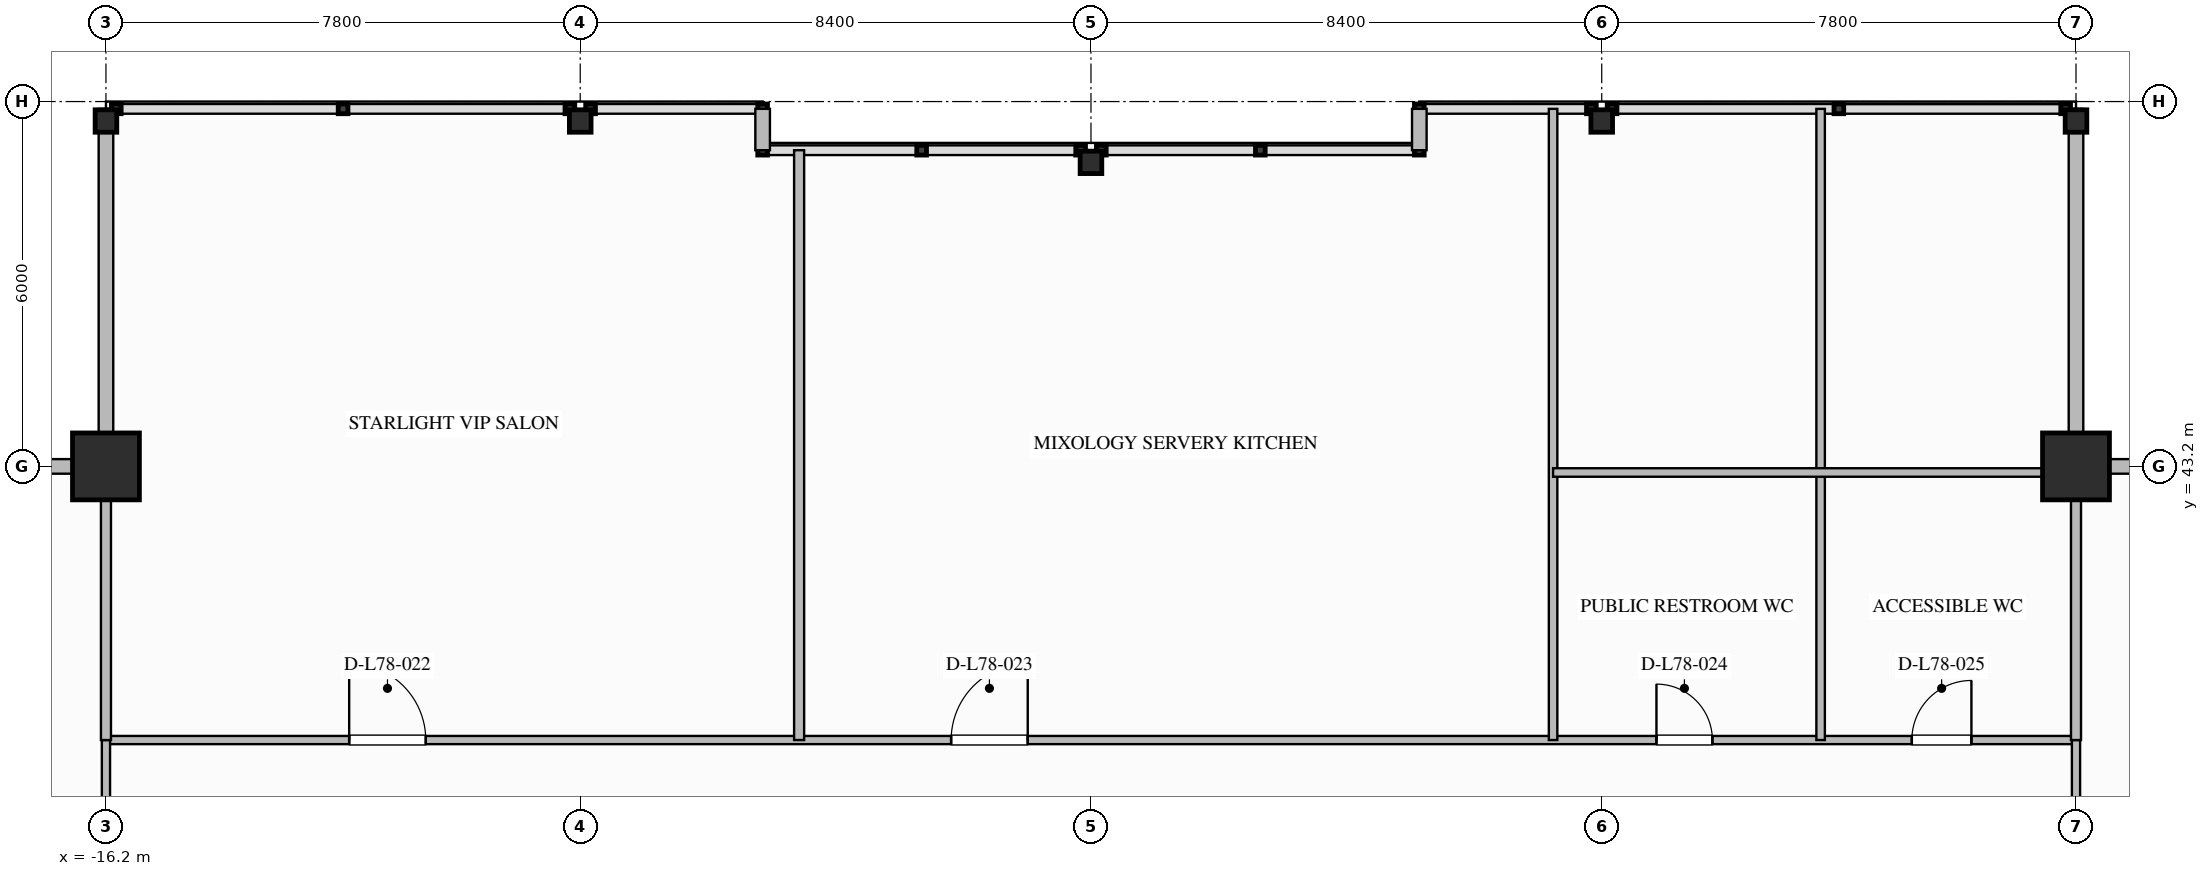
"""IFC4 building model, lengths in metres.
Left out: names, types, materials, properties, quantities, classifications, styles, units other than length and angle.
Written with IfcOpenShell. Run it as: python <this file> out.ifc"""

import sys

from ifc_helpers import new_model, si_unit, direction, frame, frame_2d, origin, origin_2d, place, context, subcontext, project, spatial, rectangle, i_section, extrude, element, fill, save


model = new_model("IFC4")
c1 = context("Model", 3, precision=1e-05, world=origin(), true_north=direction((0.0, 1.0)))
c2 = subcontext(c1, "Body", "Model", "MODEL_VIEW")
j1 = project(units=[si_unit("LENGTHUNIT", "METRE"), si_unit("PLANEANGLEUNIT", "RADIAN")], contexts=[c1])
p1 = place(None, origin())
s1 = spatial("IfcSite", under=j1, at=p1, CompositionType="ELEMENT")
p2 = place(p1, origin())
s2 = spatial("IfcBuilding", under=s1, at=p2, CompositionType="ELEMENT")
p3 = place(p2, frame((0.0, 0.0, 298.6)))
s3 = spatial("IfcBuildingStorey", under=s2, at=p3, CompositionType="ELEMENT", Elevation=298.6)
for number, where, z_axis, x_axis in (
    (1, (-16.2, 43.2, 0.0), (0.0, 0.0, 1.0), (1.0, 0.0, 0.0)),
    (2, (16.2, 43.2, 0.0), (0.0, 0.0, 1.0), (1.0, 0.0, 0.0)),
):
    element("IfcColumn", number, at=place(p3, frame(where, z_axis=z_axis, x_axis=x_axis)), inside=s3, PredefinedType="COLUMN", context=c2, shape_type="SweptSolid", body=[
        extrude(rectangle(XDim=1.1, YDim=1.1, at=origin_2d()), origin(), (0.0, 0.0, 1.0), 4.4),
    ])
for number, where, z_axis, x_axis in (
    (3, (-16.2, 48.88, 0.0), (0.0, 0.0, 1.0), (0.0, 1.0, 0.0)),
    (4, (-8.4, 48.88, 0.0), (0.0, 0.0, 1.0), (0.0, 1.0, 0.0)),
    (5, (0.0, 48.2, 0.0), (0.0, 0.0, 1.0), (0.0, 1.0, 0.0)),
    (6, (8.4, 48.88, 0.0), (0.0, 0.0, 1.0), (0.0, 1.0, 0.0)),
    (7, (16.2, 48.88, 0.0), (0.0, 0.0, 1.0), (0.0, 1.0, 0.0)),
):
    element("IfcColumn", number, at=place(p3, frame(where, z_axis=z_axis, x_axis=x_axis)), inside=s3, PredefinedType="COLUMN", context=c2, shape_type="SweptSolid", body=[
        extrude(i_section(OverallWidth=0.369, OverallDepth=0.356, WebThickness=0.011, FlangeThickness=0.018, FilletRadius=0.025, at=origin_2d()), origin(), (0.0, 0.0, 1.0), 4.397),
    ])
for number, where, z_axis, x_axis in (
    (8, (-22.08, 43.2, 0.0), (0.0, 0.0, 1.0), (1.0, 0.0, 0.0)),
    (9, (-16.2, 43.2, 0.0), (0.0, 0.0, 1.0), (0.0, 1.0, 0.0)),
    (10, (16.2, 49.08, 0.0), (0.0, 0.0, 1.0), (0.0, -1.0, 0.0)),
    (11, (16.2, 43.2, 0.0), (0.0, 0.0, 1.0), (1.0, 0.0, 0.0)),
):
    element("IfcWall", number, at=place(p3, frame(where, z_axis=z_axis, x_axis=x_axis)), inside=s3, PredefinedType="STANDARD", context=c2, shape_type="SweptSolid", body=[
        extrude(rectangle(XDim=5.88, YDim=0.24, at=frame_2d((2.94, 0.0))), origin(), (0.0, 0.0, 1.0), 3.439),
    ])
for number, where, z_axis, x_axis in (
    (12, (-5.4, 49.08, 0.0), (0.0, 0.0, 1.0), (0.0, -1.0, 0.0)),
    (13, (5.4, 48.4, 0.0), (0.0, 0.0, 1.0), (0.0, 1.0, 0.0)),
):
    element("IfcWall", number, at=place(p3, frame(where, z_axis=z_axis, x_axis=x_axis)), inside=s3, PredefinedType="STANDARD", context=c2, shape_type="SweptSolid", body=[
        extrude(rectangle(XDim=0.68, YDim=0.24, at=frame_2d((0.34, 0.0))), origin(), (0.0, 0.0, 1.0), 4.05),
    ])
p4 = place(p3, frame((-16.2, 38.7, 0.0), z_axis=(0.0, 0.0, 1.0), x_axis=(1.0, 0.0, 0.0)))
e14 = element("IfcWall", 14, at=p4, inside=s3, PredefinedType="PARTITIONING", context=c2, shape_type="SweptSolid", body=[
    extrude(rectangle(XDim=32.4, YDim=0.135, at=frame_2d((16.2, 0.0))), origin(), (0.0, 0.0, 1.0), 4.05),
])
p5 = place(p4, frame((4.0, 0.0, 0.0)))
e15 = element("IfcOpeningElement", 15, at=p5, cuts=e14, PredefinedType="OPENING", context=c2, shape_type="SweptSolid", body=[
    extrude(rectangle(XDim=1.26, YDim=2.2, at=frame_2d((0.63, 1.1))), frame((0.0, 0.077, 0.0), z_axis=(0.0, -1.0, 0.0), x_axis=(1.0, 0.0, 0.0)), (0.0, 0.0, 1.0), 0.155),
])
p6 = place(p4, frame((13.9, 0.0, 0.0)))
e16 = element("IfcOpeningElement", 16, at=p6, cuts=e14, PredefinedType="OPENING", context=c2, shape_type="SweptSolid", body=[
    extrude(rectangle(XDim=1.26, YDim=2.2, at=frame_2d((0.63, 1.1))), frame((0.0, 0.077, 0.0), z_axis=(0.0, -1.0, 0.0), x_axis=(1.0, 0.0, 0.0)), (0.0, 0.0, 1.0), 0.155),
])
p7 = place(p4, frame((25.5, 0.0, 0.0)))
e17 = element("IfcOpeningElement", 17, at=p7, cuts=e14, PredefinedType="OPENING", context=c2, shape_type="SweptSolid", body=[
    extrude(rectangle(XDim=0.92, YDim=2.1, at=frame_2d((0.46, 1.05))), frame((0.0, 0.077, 0.0), z_axis=(0.0, -1.0, 0.0), x_axis=(1.0, 0.0, 0.0)), (0.0, 0.0, 1.0), 0.155),
])
p8 = place(p4, frame((29.7, 0.0, 0.0)))
e18 = element("IfcOpeningElement", 18, at=p8, cuts=e14, PredefinedType="OPENING", context=c2, shape_type="SweptSolid", body=[
    extrude(rectangle(XDim=0.98, YDim=2.1, at=frame_2d((0.49, 1.05))), frame((0.0, 0.077, 0.0), z_axis=(0.0, -1.0, 0.0), x_axis=(1.0, 0.0, 0.0)), (0.0, 0.0, 1.0), 0.155),
])
for number, where, z_axis, x_axis in (
    (19, (-16.2, 35.6, 0.0), (0.0, 0.0, 1.0), (0.0, 1.0, 0.0)),
    (20, (16.2, 35.6, 0.0), (0.0, 0.0, 1.0), (0.0, 1.0, 0.0)),
):
    element("IfcWall", number, at=place(p3, frame(where, z_axis=z_axis, x_axis=x_axis)), inside=s3, PredefinedType="PARTITIONING", context=c2, shape_type="SweptSolid", body=[
        extrude(rectangle(XDim=3.1, YDim=0.135, at=frame_2d((1.55, 0.0))), origin(), (0.0, 0.0, 1.0), 3.424),
    ])
for number, where, z_axis, x_axis in (
    (21, (-16.2, 38.7, 0.0), (0.0, 0.0, 1.0), (0.0, 1.0, 0.0)),
    (22, (16.2, 38.7, 0.0), (0.0, 0.0, 1.0), (0.0, 1.0, 0.0)),
):
    element("IfcWall", number, at=place(p3, frame(where, z_axis=z_axis, x_axis=x_axis)), inside=s3, PredefinedType="PARTITIONING", context=c2, shape_type="SweptSolid", body=[
        extrude(rectangle(XDim=4.38, YDim=0.165, at=frame_2d((2.19, 0.0))), origin(), (0.0, 0.0, 1.0), 3.424),
    ])
p9 = place(p3, frame((-4.8, 38.7, 0.0), z_axis=(0.0, 0.0, 1.0), x_axis=(0.0, 1.0, 0.0)))
e23 = element("IfcWall", 23, at=p9, inside=s3, PredefinedType="PARTITIONING", context=c2, shape_type="SweptSolid", body=[
    extrude(rectangle(XDim=9.7, YDim=0.165, at=frame_2d((4.85, 0.0))), origin(), (0.0, 0.0, 1.0), 4.05),
])
for number, where, z_axis, x_axis in (
    (24, (7.6, 38.7, 0.0), (0.0, 0.0, 1.0), (0.0, 1.0, 0.0)),
    (25, (12.0, 38.7, 0.0), (0.0, 0.0, 1.0), (0.0, 1.0, 0.0)),
):
    element("IfcWall", number, at=place(p3, frame(where, z_axis=z_axis, x_axis=x_axis)), inside=s3, PredefinedType="PLUMBINGWALL", context=c2, shape_type="SweptSolid", body=[
        extrude(rectangle(XDim=10.38, YDim=0.14, at=frame_2d((5.19, 0.0))), origin(), (0.0, 0.0, 1.0), 4.05),
    ])
p10 = place(p3, frame((7.6, 43.1, 0.0), z_axis=(0.0, 0.0, 1.0), x_axis=(1.0, 0.0, 0.0)))
e26 = element("IfcWall", 26, at=p10, inside=s3, PredefinedType="PLUMBINGWALL", context=c2, shape_type="SweptSolid", body=[
    extrude(rectangle(XDim=8.6, YDim=0.14, at=frame_2d((4.3, 0.0))), origin(), (0.0, 0.0, 1.0), 3.424),
])
p11 = place(p5, origin())
e27 = element("IfcDoor", 27, at=p11, inside=s3, OperationType="SINGLE_SWING_LEFT", PredefinedType="DOOR", context=c2, shape_type="SweptSolid", body=[
    extrude(rectangle(XDim=1.26, YDim=2.2, at=frame_2d((0.63, 1.1))), frame((0.0, 0.025, 0.0), z_axis=(0.0, -1.0, 0.0), x_axis=(1.0, 0.0, 0.0)), (0.0, 0.0, 1.0), 0.05),
])
fill(e15, e27)
p12 = place(p6, origin())
e28 = element("IfcDoor", 28, at=p12, inside=s3, OperationType="SINGLE_SWING_RIGHT", PredefinedType="DOOR", context=c2, shape_type="SweptSolid", body=[
    extrude(rectangle(XDim=1.26, YDim=2.2, at=frame_2d((0.63, 1.1))), frame((0.0, 0.025, 0.0), z_axis=(0.0, -1.0, 0.0), x_axis=(1.0, 0.0, 0.0)), (0.0, 0.0, 1.0), 0.05),
])
fill(e16, e28)
p13 = place(p7, origin())
e29 = element("IfcDoor", 29, at=p13, inside=s3, OperationType="SINGLE_SWING_LEFT", PredefinedType="DOOR", context=c2, shape_type="SweptSolid", body=[
    extrude(rectangle(XDim=0.92, YDim=2.1, at=frame_2d((0.46, 1.05))), frame((0.0, 0.025, 0.0), z_axis=(0.0, -1.0, 0.0), x_axis=(1.0, 0.0, 0.0)), (0.0, 0.0, 1.0), 0.05),
])
fill(e17, e29)
p14 = place(p8, origin())
e30 = element("IfcDoor", 30, at=p14, inside=s3, OperationType="SINGLE_SWING_RIGHT", PredefinedType="DOOR", context=c2, shape_type="SweptSolid", body=[
    extrude(rectangle(XDim=0.98, YDim=2.1, at=frame_2d((0.49, 1.05))), frame((0.0, 0.025, 0.0), z_axis=(0.0, -1.0, 0.0), x_axis=(1.0, 0.0, 0.0)), (0.0, 0.0, 1.0), 0.05),
])
fill(e18, e30)
save(model, sys.argv[1])
